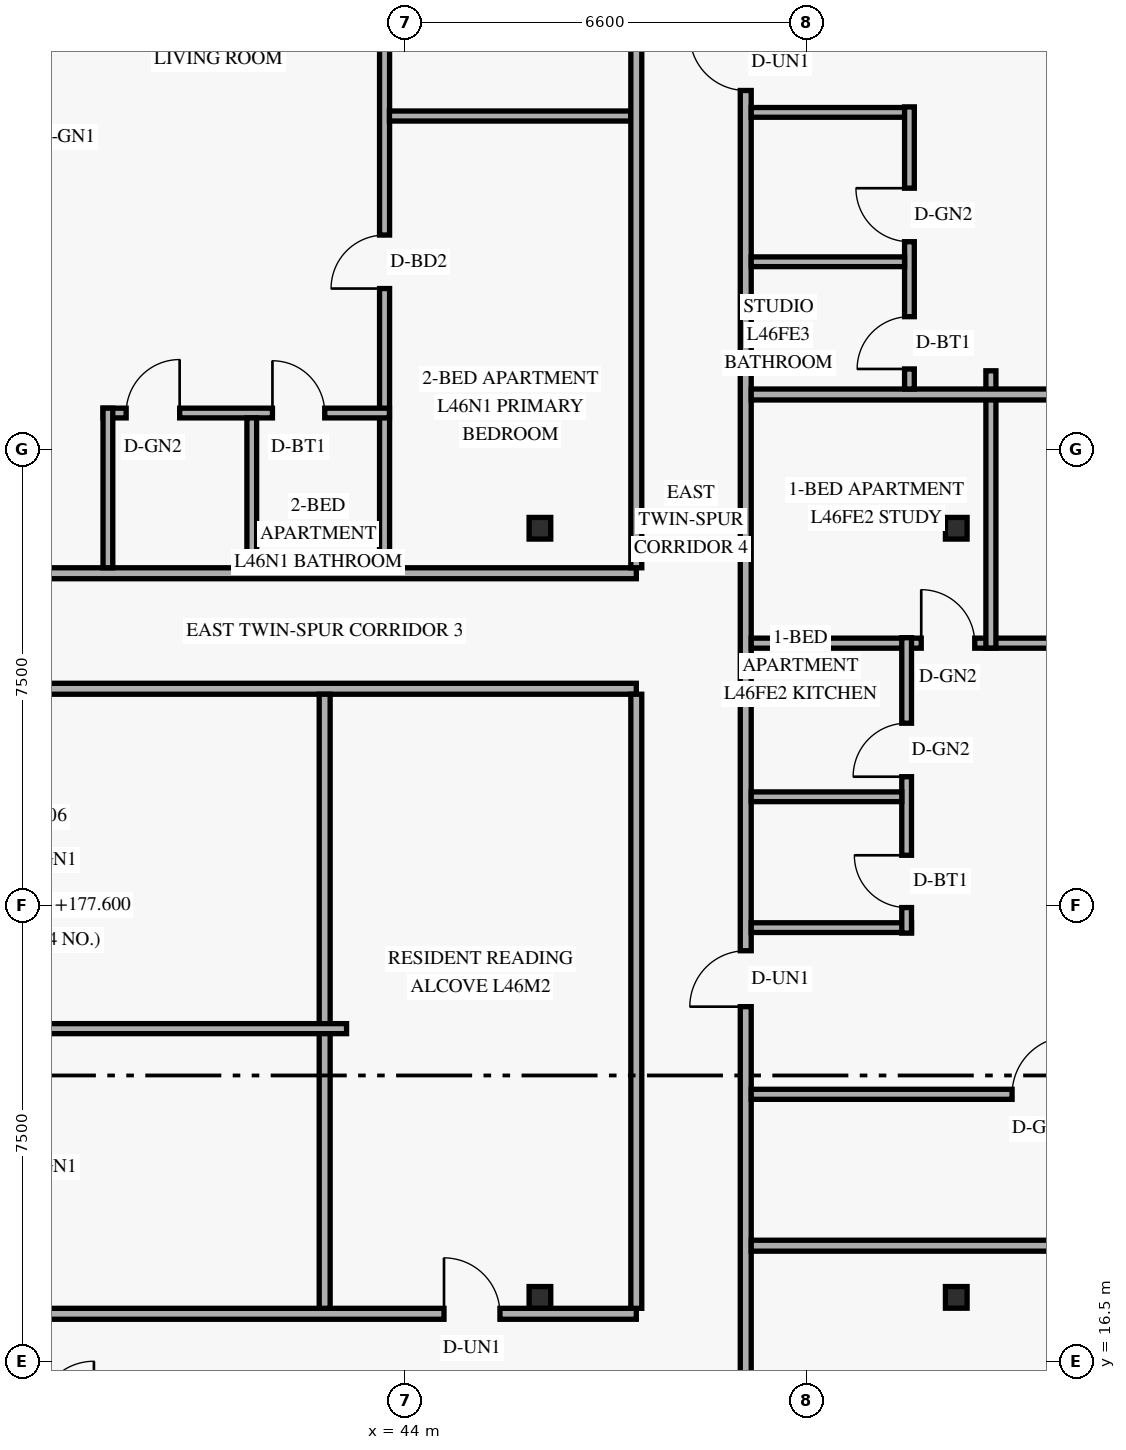
"""IFC4 building model, lengths in metres.
Left out: names, types, materials, properties, quantities, classifications, styles, units other than length and angle.
Written with IfcOpenShell. Run it as: python <this file> out.ifc"""

import sys

from ifc_helpers import new_model, si_unit, direction, frame, frame_2d, origin, origin_2d, place, context, subcontext, project, spatial, rectangle, hollow_rectangle, extrude, element, fill, save


model = new_model("IFC4")
c1 = context("Model", 3, precision=1e-05, world=origin(), true_north=direction((0.0, 1.0)))
c2 = subcontext(c1, "Body", "Model", "MODEL_VIEW")
j1 = project(units=[si_unit("LENGTHUNIT", "METRE"), si_unit("PLANEANGLEUNIT", "RADIAN")], contexts=[c1])
p1 = place(None, origin())
s1 = spatial("IfcSite", under=j1, at=p1, CompositionType="ELEMENT")
p2 = place(p1, origin())
s2 = spatial("IfcBuilding", under=s1, at=p2, CompositionType="ELEMENT")
p3 = place(p2, frame((0.0, 0.0, 177.6)))
s3 = spatial("IfcBuildingStorey", under=s2, at=p3, CompositionType="ELEMENT", Elevation=177.6)
for number, where, z_axis, x_axis in (
    (1, (46.152, 17.55, 0.0), (0.035, 0.0, 0.999), (0.0, 1.0, 0.0)),
    (2, (46.152, 30.2, 0.0), (0.035, 0.0, 0.999), (0.0, 1.0, 0.0)),
):
    element("IfcColumn", number, at=place(p3, frame(where, z_axis=z_axis, x_axis=x_axis)), inside=s3, PredefinedType="COLUMN", context=c2, shape_type="SweptSolid", body=[
        extrude(hollow_rectangle(XDim=0.356, YDim=0.356, WallThickness=0.016, at=origin_2d()), origin(), (0.0, 0.0, 1.0), 3.602),
    ])
for number, where, z_axis, x_axis in (
    (3, (52.958, 17.55, 0.0), (0.058, 0.0, 0.998), (0.0, 1.0, 0.0)),
    (4, (52.958, 30.2, 0.0), (0.058, 0.0, 0.998), (0.0, 1.0, 0.0)),
):
    element("IfcColumn", number, at=place(p3, frame(where, z_axis=z_axis, x_axis=x_axis)), inside=s3, PredefinedType="COLUMN", context=c2, shape_type="SweptSolid", body=[
        extrude(hollow_rectangle(XDim=0.356, YDim=0.356, WallThickness=0.016, at=origin_2d()), origin(), (0.0, 0.0, 1.0), 3.606),
    ])
p4 = place(p3, frame((37.64, 17.28, 0.0), z_axis=(0.0, 0.0, 1.0), x_axis=(1.0, 0.0, 0.0)))
e5 = element("IfcWall", 5, at=p4, inside=s3, PredefinedType="STANDARD", context=c2, shape_type="SweptSolid", body=[
    extrude(rectangle(XDim=10.16, YDim=0.18, at=frame_2d((5.08, 0.0))), origin(), (0.0, 0.0, 1.0), 2.73),
])
p5 = place(p4, frame((6.998, 0.0, 0.0)))
e6 = element("IfcOpeningElement", 6, at=p5, cuts=e5, PredefinedType="OPENING", context=c2, shape_type="SweptSolid", body=[
    extrude(rectangle(XDim=0.92, YDim=2.15, at=frame_2d((0.46, 1.075))), frame((0.0, 0.1, 0.0), z_axis=(0.0, -1.0, 0.0), x_axis=(1.0, 0.0, 0.0)), (0.0, 0.0, 1.0), 0.2),
])
p6 = place(p3, frame((37.64, 27.56, 0.0), z_axis=(0.0, 0.0, 1.0), x_axis=(1.0, 0.0, 0.0)))
e7 = element("IfcWall", 7, at=p6, inside=s3, PredefinedType="STANDARD", context=c2, shape_type="SweptSolid", body=[
    extrude(rectangle(XDim=10.16, YDim=0.18, at=frame_2d((5.08, 0.0))), origin(), (0.0, 0.0, 1.0), 2.73),
])
p7 = place(p3, frame((35.51, 29.46, 0.0), z_axis=(0.0, 0.0, 1.0), x_axis=(1.0, 0.0, 0.0)))
e8 = element("IfcWall", 8, at=p7, inside=s3, PredefinedType="STANDARD", context=c2, shape_type="SweptSolid", body=[
    extrude(rectangle(XDim=12.29, YDim=0.18, at=frame_2d((6.145, 0.0))), origin(), (0.0, 0.0, 1.0), 2.73),
])
p8 = place(p7, frame((0.32, 0.0, 0.0)))
e9 = element("IfcOpeningElement", 9, at=p8, cuts=e8, PredefinedType="OPENING", context=c2, shape_type="SweptSolid", body=[
    extrude(rectangle(XDim=0.92, YDim=2.15, at=frame_2d((0.46, 1.075))), frame((0.0, 0.1, 0.0), z_axis=(0.0, -1.0, 0.0), x_axis=(1.0, 0.0, 0.0)), (0.0, 0.0, 1.0), 0.2),
])
p9 = place(p3, frame((43.66, 29.55, 0.0), z_axis=(0.0, 0.0, 1.0), x_axis=(0.0, 1.0, 0.0)))
e10 = element("IfcWall", 10, at=p9, inside=s3, PredefinedType="PARTITIONING", context=c2, shape_type="SweptSolid", body=[
    extrude(rectangle(XDim=14.17, YDim=0.165, at=frame_2d((7.085, 0.0))), origin(), (0.0, 0.0, 1.0), 2.73),
])
p10 = place(p9, frame((4.593, 0.0, 0.0)))
e11 = element("IfcOpeningElement", 11, at=p10, cuts=e10, PredefinedType="OPENING", context=c2, shape_type="SweptSolid", body=[
    extrude(rectangle(XDim=0.88, YDim=2.14, at=frame_2d((0.44, 1.07))), frame((0.0, 0.093, 0.0), z_axis=(0.0, -1.0, 0.0), x_axis=(1.0, 0.0, 0.0)), (0.0, 0.0, 1.0), 0.185),
])
p11 = place(p9, frame((10.47, 0.0, 0.0)))
e12 = element("IfcOpeningElement", 12, at=p11, cuts=e10, PredefinedType="OPENING", context=c2, shape_type="SweptSolid", body=[
    extrude(rectangle(XDim=0.88, YDim=2.14, at=frame_2d((0.44, 1.07))), frame((0.0, 0.093, 0.0), z_axis=(0.0, -1.0, 0.0), x_axis=(1.0, 0.0, 0.0)), (0.0, 0.0, 1.0), 0.185),
])
p12 = place(p3, frame((39.03, 32.095, 0.0), z_axis=(0.0, 0.0, 1.0), x_axis=(1.0, 0.0, 0.0)))
e13 = element("IfcWall", 13, at=p12, inside=s3, PredefinedType="PLUMBINGWALL", context=c2, shape_type="SweptSolid", body=[
    extrude(rectangle(XDim=4.71, YDim=0.16, at=frame_2d((2.355, 0.0))), origin(), (0.0, 0.0, 1.0), 3.36),
])
p13 = place(p12, frame((0.38, 0.0, 0.0)))
e14 = element("IfcOpeningElement", 14, at=p13, cuts=e13, PredefinedType="OPENING", context=c2, shape_type="SweptSolid", body=[
    extrude(rectangle(XDim=0.88, YDim=2.12, at=frame_2d((0.44, 1.06))), frame((0.0, 0.09, 0.0), z_axis=(0.0, -1.0, 0.0), x_axis=(1.0, 0.0, 0.0)), (0.0, 0.0, 1.0), 0.18),
])
p14 = place(p12, frame((2.786, 0.0, 0.0)))
e15 = element("IfcOpeningElement", 15, at=p14, cuts=e13, PredefinedType="OPENING", context=c2, shape_type="SweptSolid", body=[
    extrude(rectangle(XDim=0.86, YDim=2.12, at=frame_2d((0.43, 1.06))), frame((0.0, 0.09, 0.0), z_axis=(0.0, -1.0, 0.0), x_axis=(1.0, 0.0, 0.0)), (0.0, 0.0, 1.0), 0.18),
])
p15 = place(p3, frame((39.11, 29.55, 0.0), z_axis=(0.0, 0.0, 1.0), x_axis=(0.0, 1.0, 0.0)))
e16 = element("IfcWall", 16, at=p15, inside=s3, PredefinedType="PLUMBINGWALL", context=c2, shape_type="SweptSolid", body=[
    extrude(rectangle(XDim=2.625, YDim=0.16, at=frame_2d((1.312, 0.0))), origin(), (0.0, 0.0, 1.0), 2.73),
])
p16 = place(p3, frame((41.476, 29.55, 0.0), z_axis=(0.0, 0.0, 1.0), x_axis=(0.0, 1.0, 0.0)))
e17 = element("IfcWall", 17, at=p16, inside=s3, PredefinedType="PLUMBINGWALL", context=c2, shape_type="SweptSolid", body=[
    extrude(rectangle(XDim=2.465, YDim=0.16, at=frame_2d((1.232, 0.0))), origin(), (0.0, 0.0, 1.0), 2.73),
])
p17 = place(p3, frame((43.74, 36.98, 0.0), z_axis=(0.0, 0.0, 1.0), x_axis=(1.0, 0.0, 0.0)))
e18 = element("IfcWall", 18, at=p17, inside=s3, PredefinedType="PARTITIONING", context=c2, shape_type="SweptSolid", body=[
    extrude(rectangle(XDim=3.97, YDim=0.165, at=frame_2d((1.985, 0.0))), origin(), (0.0, 0.0, 1.0), 2.73),
])
p18 = place(p3, frame((42.675, 17.37, 0.0), z_axis=(0.0, 0.0, 1.0), x_axis=(0.0, 1.0, 0.0)))
e19 = element("IfcWall", 19, at=p18, inside=s3, PredefinedType="PARTITIONING", context=c2, shape_type="SweptSolid", body=[
    extrude(rectangle(XDim=10.1, YDim=0.18, at=frame_2d((5.05, 0.0))), origin(), (0.0, 0.0, 1.0), 2.73),
])
p19 = place(p3, frame((37.19, 21.97, 0.0), z_axis=(0.0, 0.0, 1.0), x_axis=(1.0, 0.0, 0.0)))
e20 = element("IfcWall", 20, at=p19, inside=s3, PredefinedType="PARTITIONING", context=c2, shape_type="SweptSolid", body=[
    extrude(rectangle(XDim=5.845, YDim=0.165, at=frame_2d((2.922, 0.0))), origin(), (0.0, 0.0, 1.0), 3.36),
])
p20 = place(p3, frame((49.6, 4.28, 0.0), z_axis=(0.0, 0.0, 1.0), x_axis=(0.0, 1.0, 0.0)))
e21 = element("IfcWall", 21, at=p20, inside=s3, PredefinedType="STANDARD", context=c2, shape_type="SweptSolid", body=[
    extrude(rectangle(XDim=39.44, YDim=0.18, at=frame_2d((19.72, 0.0))), origin(), (0.0, 0.0, 1.0), 2.73),
])
p21 = place(p20, frame((8.52, 0.0, 0.0)))
e22 = element("IfcOpeningElement", 22, at=p21, cuts=e21, PredefinedType="OPENING", context=c2, shape_type="SweptSolid", body=[
    extrude(rectangle(XDim=0.92, YDim=2.15, at=frame_2d((0.46, 1.075))), frame((0.0, 0.1, 0.0), z_axis=(0.0, -1.0, 0.0), x_axis=(1.0, 0.0, 0.0)), (0.0, 0.0, 1.0), 0.2),
])
p22 = place(p20, frame((18.052, 0.0, 0.0)))
e23 = element("IfcOpeningElement", 23, at=p22, cuts=e21, PredefinedType="OPENING", context=c2, shape_type="SweptSolid", body=[
    extrude(rectangle(XDim=0.92, YDim=2.15, at=frame_2d((0.46, 1.075))), frame((0.0, 0.1, 0.0), z_axis=(0.0, -1.0, 0.0), x_axis=(1.0, 0.0, 0.0)), (0.0, 0.0, 1.0), 0.2),
])
p23 = place(p20, frame((33.12, 0.0, 0.0)))
e24 = element("IfcOpeningElement", 24, at=p23, cuts=e21, PredefinedType="OPENING", context=c2, shape_type="SweptSolid", body=[
    extrude(rectangle(XDim=0.92, YDim=2.15, at=frame_2d((0.46, 1.075))), frame((0.0, 0.1, 0.0), z_axis=(0.0, -1.0, 0.0), x_axis=(1.0, 0.0, 0.0)), (0.0, 0.0, 1.0), 0.2),
])
p24 = place(p3, frame((47.8, 17.37, 0.0), z_axis=(0.0, 0.0, 1.0), x_axis=(0.0, 1.0, 0.0)))
e25 = element("IfcWall", 25, at=p24, inside=s3, PredefinedType="STANDARD", context=c2, shape_type="SweptSolid", body=[
    extrude(rectangle(XDim=10.1, YDim=0.18, at=frame_2d((5.05, 0.0))), origin(), (0.0, 0.0, 1.0), 2.73),
])
p25 = place(p3, frame((47.8, 29.55, 0.0), z_axis=(0.0, 0.0, 1.0), x_axis=(0.0, 1.0, 0.0)))
e26 = element("IfcWall", 26, at=p25, inside=s3, PredefinedType="STANDARD", context=c2, shape_type="SweptSolid", body=[
    extrude(rectangle(XDim=14.17, YDim=0.18, at=frame_2d((7.085, 0.0))), origin(), (0.0, 0.0, 1.0), 2.73),
])
p26 = place(p3, frame((49.69, 18.4, 0.0), z_axis=(0.0, 0.0, 1.0), x_axis=(1.0, 0.0, 0.0)))
e27 = element("IfcWall", 27, at=p26, inside=s3, PredefinedType="PARTITIONING", context=c2, shape_type="SweptSolid", body=[
    extrude(rectangle(XDim=8.63, YDim=0.18, at=frame_2d((4.315, 0.0))), origin(), (0.0, 0.0, 1.0), 2.879),
])
p27 = place(p3, frame((49.69, 28.31, 0.0), z_axis=(0.0, 0.0, 1.0), x_axis=(1.0, 0.0, 0.0)))
e28 = element("IfcWall", 28, at=p27, inside=s3, PredefinedType="PARTITIONING", context=c2, shape_type="SweptSolid", body=[
    extrude(rectangle(XDim=8.63, YDim=0.165, at=frame_2d((4.315, 0.0))), origin(), (0.0, 0.0, 1.0), 2.879),
])
p28 = place(p27, frame((2.796, 0.0, 0.0)))
e29 = element("IfcOpeningElement", 29, at=p28, cuts=e28, PredefinedType="OPENING", context=c2, shape_type="SweptSolid", body=[
    extrude(rectangle(XDim=0.88, YDim=2.12, at=frame_2d((0.44, 1.06))), frame((0.0, 0.093, 0.0), z_axis=(0.0, -1.0, 0.0), x_axis=(1.0, 0.0, 0.0)), (0.0, 0.0, 1.0), 0.185),
])
p29 = place(p27, frame((5.946, 0.0, 0.0)))
e30 = element("IfcOpeningElement", 30, at=p29, cuts=e28, PredefinedType="OPENING", context=c2, shape_type="SweptSolid", body=[
    extrude(rectangle(XDim=0.9, YDim=2.14, at=frame_2d((0.45, 1.07))), frame((0.0, 0.093, 0.0), z_axis=(0.0, -1.0, 0.0), x_axis=(1.0, 0.0, 0.0)), (0.0, 0.0, 1.0), 0.185),
])
p30 = place(p3, frame((49.69, 23.632, 0.0), z_axis=(0.0, 0.0, 1.0), x_axis=(1.0, 0.0, 0.0)))
e31 = element("IfcWall", 31, at=p30, inside=s3, PredefinedType="PLUMBINGWALL", context=c2, shape_type="SweptSolid", body=[
    extrude(rectangle(XDim=2.636, YDim=0.16, at=frame_2d((1.318, 0.0))), origin(), (0.0, 0.0, 1.0), 3.36),
])
p31 = place(p3, frame((52.246, 23.542, 0.0), z_axis=(0.0, 0.0, 1.0), x_axis=(0.0, 1.0, 0.0)))
e32 = element("IfcWall", 32, at=p31, inside=s3, PredefinedType="PLUMBINGWALL", context=c2, shape_type="SweptSolid", body=[
    extrude(rectangle(XDim=4.858, YDim=0.16, at=frame_2d((2.429, 0.0))), origin(), (0.0, 0.0, 1.0), 3.36),
])
p32 = place(p31, frame((0.42, 0.0, 0.0)))
e33 = element("IfcOpeningElement", 33, at=p32, cuts=e32, PredefinedType="OPENING", context=c2, shape_type="SweptSolid", body=[
    extrude(rectangle(XDim=0.86, YDim=2.12, at=frame_2d((0.43, 1.06))), frame((0.0, 0.09, 0.0), z_axis=(0.0, -1.0, 0.0), x_axis=(1.0, 0.0, 0.0)), (0.0, 0.0, 1.0), 0.18),
])
p33 = place(p31, frame((2.572, 0.0, 0.0)))
e34 = element("IfcOpeningElement", 34, at=p33, cuts=e32, PredefinedType="OPENING", context=c2, shape_type="SweptSolid", body=[
    extrude(rectangle(XDim=0.88, YDim=2.12, at=frame_2d((0.44, 1.06))), frame((0.0, 0.09, 0.0), z_axis=(0.0, -1.0, 0.0), x_axis=(1.0, 0.0, 0.0)), (0.0, 0.0, 1.0), 0.18),
])
p34 = place(p3, frame((49.69, 25.784, 0.0), z_axis=(0.0, 0.0, 1.0), x_axis=(1.0, 0.0, 0.0)))
e35 = element("IfcWall", 35, at=p34, inside=s3, PredefinedType="PLUMBINGWALL", context=c2, shape_type="SweptSolid", body=[
    extrude(rectangle(XDim=2.476, YDim=0.16, at=frame_2d((1.238, 0.0))), origin(), (0.0, 0.0, 1.0), 3.36),
])
p35 = place(p3, frame((49.69, 20.89, 0.0), z_axis=(0.0, 0.0, 1.0), x_axis=(1.0, 0.0, 0.0)))
e36 = element("IfcWall", 36, at=p35, inside=s3, PredefinedType="PARTITIONING", context=c2, shape_type="SweptSolid", body=[
    extrude(rectangle(XDim=8.63, YDim=0.165, at=frame_2d((4.315, 0.0))), origin(), (0.0, 0.0, 1.0), 2.879),
])
p36 = place(p35, frame((4.29, 0.0, 0.0)))
e37 = element("IfcOpeningElement", 37, at=p36, cuts=e36, PredefinedType="OPENING", context=c2, shape_type="SweptSolid", body=[
    extrude(rectangle(XDim=0.95, YDim=2.15, at=frame_2d((0.475, 1.075))), frame((0.0, 0.093, 0.0), z_axis=(0.0, -1.0, 0.0), x_axis=(1.0, 0.0, 0.0)), (0.0, 0.0, 1.0), 0.185),
])
p37 = place(p3, frame((53.632, 28.23, 0.0), z_axis=(0.0, 0.0, 1.0), x_axis=(0.0, 1.0, 0.0)))
e38 = element("IfcWall", 38, at=p37, inside=s3, PredefinedType="PARTITIONING", context=c2, shape_type="SweptSolid", body=[
    extrude(rectangle(XDim=4.56, YDim=0.165, at=frame_2d((2.28, 0.0))), origin(), (0.0, 0.0, 1.0), 3.36),
])
p38 = place(p3, frame((49.69, 32.4, 0.0), z_axis=(0.0, 0.0, 1.0), x_axis=(1.0, 0.0, 0.0)))
e39 = element("IfcWall", 39, at=p38, inside=s3, PredefinedType="PARTITIONING", context=c2, shape_type="SweptSolid", body=[
    extrude(rectangle(XDim=8.63, YDim=0.18, at=frame_2d((4.315, 0.0))), origin(), (0.0, 0.0, 1.0), 2.879),
])
p39 = place(p3, frame((49.69, 37.04, 0.0), z_axis=(0.0, 0.0, 1.0), x_axis=(1.0, 0.0, 0.0)))
e40 = element("IfcWall", 40, at=p39, inside=s3, PredefinedType="PLUMBINGWALL", context=c2, shape_type="SweptSolid", body=[
    extrude(rectangle(XDim=2.682, YDim=0.16, at=frame_2d((1.341, 0.0))), origin(), (0.0, 0.0, 1.0), 3.36),
])
p40 = place(p3, frame((52.292, 32.49, 0.0), z_axis=(0.0, 0.0, 1.0), x_axis=(0.0, 1.0, 0.0)))
e41 = element("IfcWall", 41, at=p40, inside=s3, PredefinedType="PLUMBINGWALL", context=c2, shape_type="SweptSolid", body=[
    extrude(rectangle(XDim=4.64, YDim=0.16, at=frame_2d((2.32, 0.0))), origin(), (0.0, 0.0, 1.0), 2.984),
])
p41 = place(p40, frame((0.33, 0.0, 0.0)))
e42 = element("IfcOpeningElement", 42, at=p41, cuts=e41, PredefinedType="OPENING", context=c2, shape_type="SweptSolid", body=[
    extrude(rectangle(XDim=0.86, YDim=2.12, at=frame_2d((0.43, 1.06))), frame((0.0, 0.09, 0.0), z_axis=(0.0, -1.0, 0.0), x_axis=(1.0, 0.0, 0.0)), (0.0, 0.0, 1.0), 0.18),
])
p42 = place(p40, frame((2.423, 0.0, 0.0)))
e43 = element("IfcOpeningElement", 43, at=p42, cuts=e41, PredefinedType="OPENING", context=c2, shape_type="SweptSolid", body=[
    extrude(rectangle(XDim=0.88, YDim=2.12, at=frame_2d((0.44, 1.06))), frame((0.0, 0.09, 0.0), z_axis=(0.0, -1.0, 0.0), x_axis=(1.0, 0.0, 0.0)), (0.0, 0.0, 1.0), 0.18),
])
p43 = place(p3, frame((49.69, 34.583, 0.0), z_axis=(0.0, 0.0, 1.0), x_axis=(1.0, 0.0, 0.0)))
e44 = element("IfcWall", 44, at=p43, inside=s3, PredefinedType="PLUMBINGWALL", context=c2, shape_type="SweptSolid", body=[
    extrude(rectangle(XDim=2.522, YDim=0.16, at=frame_2d((1.261, 0.0))), origin(), (0.0, 0.0, 1.0), 2.984),
])
p44 = place(p13, origin())
e45 = element("IfcDoor", 45, at=p44, inside=s3, OperationType="SINGLE_SWING_RIGHT", PredefinedType="DOOR", context=c2, shape_type="SweptSolid", body=[
    extrude(rectangle(XDim=0.88, YDim=2.12, at=frame_2d((0.44, 1.06))), frame((0.0, 0.025, 0.0), z_axis=(0.0, -1.0, 0.0), x_axis=(1.0, 0.0, 0.0)), (0.0, 0.0, 1.0), 0.05),
])
fill(e14, e45)
p45 = place(p14, origin())
e46 = element("IfcDoor", 46, at=p45, inside=s3, OperationType="SINGLE_SWING_LEFT", PredefinedType="DOOR", context=c2, shape_type="SweptSolid", body=[
    extrude(rectangle(XDim=0.86, YDim=2.12, at=frame_2d((0.43, 1.06))), frame((0.0, 0.025, 0.0), z_axis=(0.0, -1.0, 0.0), x_axis=(1.0, 0.0, 0.0)), (0.0, 0.0, 1.0), 0.05),
])
fill(e15, e46)
p46 = place(p10, origin())
e47 = element("IfcDoor", 47, at=p46, inside=s3, OperationType="SINGLE_SWING_LEFT", PredefinedType="DOOR", context=c2, shape_type="SweptSolid", body=[
    extrude(rectangle(XDim=0.88, YDim=2.14, at=frame_2d((0.44, 1.07))), frame((0.0, 0.025, 0.0), z_axis=(0.0, -1.0, 0.0), x_axis=(1.0, 0.0, 0.0)), (0.0, 0.0, 1.0), 0.05),
])
fill(e11, e47)
p47 = place(p5, origin())
e48 = element("IfcDoor", 48, at=p47, inside=s3, OperationType="SINGLE_SWING_LEFT", PredefinedType="DOOR", context=c2, shape_type="SweptSolid", body=[
    extrude(rectangle(XDim=0.92, YDim=2.15, at=frame_2d((0.46, 1.075))), frame((0.0, 0.025, 0.0), z_axis=(0.0, -1.0, 0.0), x_axis=(1.0, 0.0, 0.0)), (0.0, 0.0, 1.0), 0.05),
])
fill(e6, e48)
p48 = place(p36, origin())
e49 = element("IfcDoor", 49, at=p48, inside=s3, OperationType="SINGLE_SWING_RIGHT", PredefinedType="DOOR", context=c2, shape_type="SweptSolid", body=[
    extrude(rectangle(XDim=0.95, YDim=2.15, at=frame_2d((0.475, 1.075))), frame((0.0, 0.025, 0.0), z_axis=(0.0, -1.0, 0.0), x_axis=(1.0, 0.0, 0.0)), (0.0, 0.0, 1.0), 0.05),
])
fill(e37, e49)
p49 = place(p22, origin())
e50 = element("IfcDoor", 50, at=p49, inside=s3, OperationType="SINGLE_SWING_LEFT", PredefinedType="DOOR", context=c2, shape_type="SweptSolid", body=[
    extrude(rectangle(XDim=0.92, YDim=2.15, at=frame_2d((0.46, 1.075))), frame((0.0, 0.025, 0.0), z_axis=(0.0, -1.0, 0.0), x_axis=(1.0, 0.0, 0.0)), (0.0, 0.0, 1.0), 0.05),
])
fill(e23, e50)
p50 = place(p32, origin())
e51 = element("IfcDoor", 51, at=p50, inside=s3, OperationType="SINGLE_SWING_RIGHT", PredefinedType="DOOR", context=c2, shape_type="SweptSolid", body=[
    extrude(rectangle(XDim=0.86, YDim=2.12, at=frame_2d((0.43, 1.06))), frame((0.0, 0.025, 0.0), z_axis=(0.0, -1.0, 0.0), x_axis=(1.0, 0.0, 0.0)), (0.0, 0.0, 1.0), 0.05),
])
fill(e33, e51)
p51 = place(p33, origin())
e52 = element("IfcDoor", 52, at=p51, inside=s3, OperationType="SINGLE_SWING_LEFT", PredefinedType="DOOR", context=c2, shape_type="SweptSolid", body=[
    extrude(rectangle(XDim=0.88, YDim=2.12, at=frame_2d((0.44, 1.06))), frame((0.0, 0.025, 0.0), z_axis=(0.0, -1.0, 0.0), x_axis=(1.0, 0.0, 0.0)), (0.0, 0.0, 1.0), 0.05),
])
fill(e34, e52)
p52 = place(p28, origin())
e53 = element("IfcDoor", 53, at=p52, inside=s3, OperationType="SINGLE_SWING_LEFT", PredefinedType="DOOR", context=c2, shape_type="SweptSolid", body=[
    extrude(rectangle(XDim=0.88, YDim=2.12, at=frame_2d((0.44, 1.06))), frame((0.0, 0.025, 0.0), z_axis=(0.0, -1.0, 0.0), x_axis=(1.0, 0.0, 0.0)), (0.0, 0.0, 1.0), 0.05),
])
fill(e29, e53)
p53 = place(p23, origin())
e54 = element("IfcDoor", 54, at=p53, inside=s3, OperationType="SINGLE_SWING_RIGHT", PredefinedType="DOOR", context=c2, shape_type="SweptSolid", body=[
    extrude(rectangle(XDim=0.92, YDim=2.15, at=frame_2d((0.46, 1.075))), frame((0.0, 0.025, 0.0), z_axis=(0.0, -1.0, 0.0), x_axis=(1.0, 0.0, 0.0)), (0.0, 0.0, 1.0), 0.05),
])
fill(e24, e54)
p54 = place(p41, origin())
e55 = element("IfcDoor", 55, at=p54, inside=s3, OperationType="SINGLE_SWING_LEFT", PredefinedType="DOOR", context=c2, shape_type="SweptSolid", body=[
    extrude(rectangle(XDim=0.86, YDim=2.12, at=frame_2d((0.43, 1.06))), frame((0.0, 0.025, 0.0), z_axis=(0.0, -1.0, 0.0), x_axis=(1.0, 0.0, 0.0)), (0.0, 0.0, 1.0), 0.05),
])
fill(e42, e55)
p55 = place(p42, origin())
e56 = element("IfcDoor", 56, at=p55, inside=s3, OperationType="SINGLE_SWING_RIGHT", PredefinedType="DOOR", context=c2, shape_type="SweptSolid", body=[
    extrude(rectangle(XDim=0.88, YDim=2.12, at=frame_2d((0.44, 1.06))), frame((0.0, 0.025, 0.0), z_axis=(0.0, -1.0, 0.0), x_axis=(1.0, 0.0, 0.0)), (0.0, 0.0, 1.0), 0.05),
])
fill(e43, e56)
save(model, sys.argv[1])
